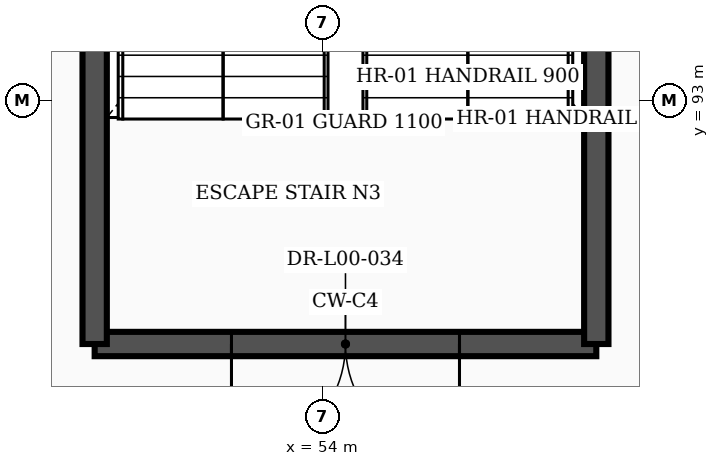
"""IFC4 building model, lengths in metres.
Left out: names, types, materials, properties, quantities, classifications, styles, units other than length and angle.
Written with IfcOpenShell. Run it as: python <this file> out.ifc"""

import sys

from ifc_helpers import new_model, si_unit, direction, frame, frame_2d, origin, place, context, subcontext, project, spatial, rectangle, extrude, element, fill, save


model = new_model("IFC4")
c1 = context("Model", 3, precision=1e-05, world=origin(), true_north=direction((0.0, 1.0)))
c2 = subcontext(c1, "Body", "Model", "MODEL_VIEW")
j1 = project(units=[si_unit("LENGTHUNIT", "METRE"), si_unit("PLANEANGLEUNIT", "RADIAN")], contexts=[c1])
p1 = place(None, origin())
s1 = spatial("IfcSite", under=j1, at=p1, CompositionType="ELEMENT")
p2 = place(p1, origin())
s2 = spatial("IfcBuilding", under=s1, at=p2, CompositionType="ELEMENT")
p3 = place(p2, origin())
s3 = spatial("IfcBuildingStorey", under=s2, at=p3, CompositionType="ELEMENT", Elevation=0.0)
p4 = place(p3, frame((51.0, 89.8, 0.0), z_axis=(0.0, 0.0, 1.0), x_axis=(1.0, 0.0, 0.0)))
e1 = element("IfcWall", 1, at=p4, inside=s3, PredefinedType="SHEAR", context=c2, shape_type="SweptSolid", body=[
    extrude(rectangle(XDim=6.6, YDim=0.32, at=frame_2d((3.3, 0.0))), origin(), (0.0, 0.0, 1.0), 5.75),
])
p5 = place(p4, frame((1.8, 0.0, 0.0)))
e2 = element("IfcOpeningElement", 2, at=p5, cuts=e1, PredefinedType="OPENING", context=c2, shape_type="SweptSolid", body=[
    extrude(rectangle(XDim=3.0, YDim=2.25, at=frame_2d((1.5, 1.125))), frame((0.0, 0.172, 0.0), z_axis=(0.0, -1.0, 0.0), x_axis=(1.0, 0.0, 0.0)), (0.0, 0.0, 1.0), 0.344),
])
for number, where, z_axis, x_axis in (
    (3, (51.0, 89.8, 0.0), (0.0, 0.0, 1.0), (0.0, 1.0, 0.0)),
    (4, (57.6, 89.8, 0.0), (0.0, 0.0, 1.0), (0.0, 1.0, 0.0)),
):
    element("IfcWall", number, at=place(p3, frame(where, z_axis=z_axis, x_axis=x_axis)), inside=s3, PredefinedType="SHEAR", context=c2, shape_type="SweptSolid", body=[
        extrude(rectangle(XDim=11.0, YDim=0.32, at=frame_2d((5.5, 0.0))), origin(), (0.0, 0.0, 1.0), 5.75),
    ])
p6 = place(p5, frame((3.0, 0.0, 0.0), z_axis=(0.0, 0.0, 1.0), x_axis=(-1.0, 0.0, 0.0)))
e5 = element("IfcDoor", 5, at=p6, inside=s3, OperationType="DOUBLE_DOOR_SINGLE_SWING", PredefinedType="DOOR", context=c2, shape_type="SweptSolid", body=[
    extrude(rectangle(XDim=3.0, YDim=2.25, at=frame_2d((1.5, 1.125))), frame((0.0, 0.025, 0.0), z_axis=(0.0, -1.0, 0.0), x_axis=(1.0, 0.0, 0.0)), (0.0, 0.0, 1.0), 0.05),
])
fill(e2, e5)
save(model, sys.argv[1])
